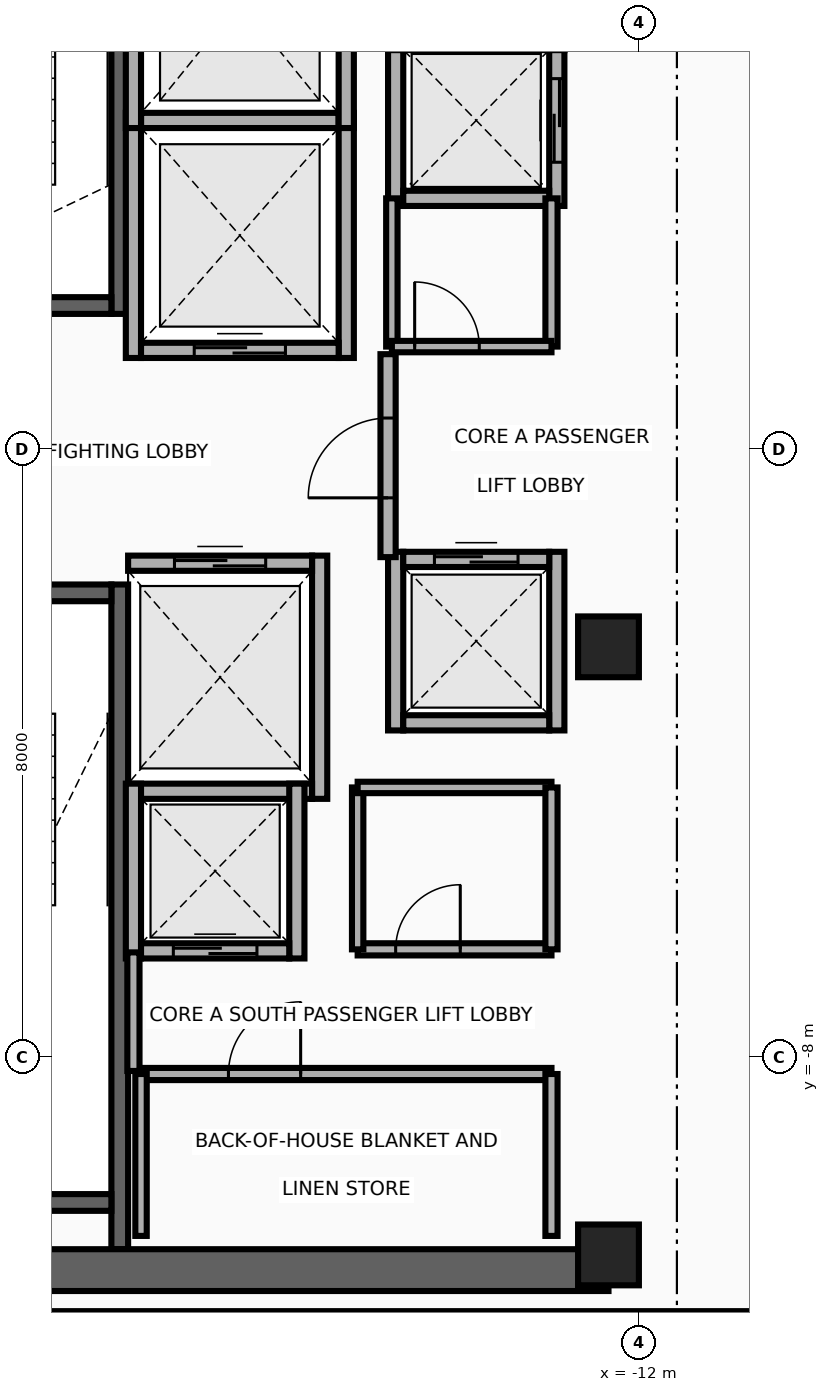
"""IFC4 building model, lengths in metres.
Left out: names, types, materials, properties, quantities, classifications, styles, units other than length and angle.
Written with IfcOpenShell. Run it as: python <this file> out.ifc"""

import sys

from ifc_helpers import new_model, si_unit, direction, frame, frame_2d, origin, origin_2d, place, context, subcontext, project, spatial, rectangle, extrude, source, transform, mapped, element, fill, save


model = new_model("IFC4")
c1 = context("Model", 3, precision=1e-05, world=origin(), true_north=direction((0.0, 1.0)))
c2 = subcontext(c1, "Body", "Model", "MODEL_VIEW")
j1 = project(units=[si_unit("LENGTHUNIT", "METRE"), si_unit("PLANEANGLEUNIT", "RADIAN")], contexts=[c1])
p1 = place(None, origin())
s1 = spatial("IfcSite", under=j1, at=p1, CompositionType="ELEMENT")
p2 = place(p1, origin())
s2 = spatial("IfcBuilding", under=s1, at=p2, CompositionType="ELEMENT")
p3 = place(p2, frame((0.0, 0.0, 247.5)))
s3 = spatial("IfcBuildingStorey", under=s2, at=p3, CompositionType="ELEMENT", Elevation=247.5)
p4 = place(p3, frame((-18.83, 1.78, 0.0), z_axis=(0.0, 0.0, 1.0), x_axis=(0.0, 1.0, 0.0)))
e1 = element("IfcWall", 1, at=p4, inside=s3, PredefinedType="SHEAR", context=c2, shape_type="SweptSolid", body=[
    extrude(rectangle(XDim=8.745, YDim=0.22, at=frame_2d((4.373, 0.0))), origin(), (0.0, 0.0, 1.0), 3.26),
])
p5 = place(p3, frame((-22.05, 1.89, 0.0), z_axis=(0.0, 0.0, 1.0), x_axis=(1.0, 0.0, 0.0)))
e2 = element("IfcWall", 2, at=p5, inside=s3, PredefinedType="SHEAR", context=c2, shape_type="SweptSolid", body=[
    extrude(rectangle(XDim=3.11, YDim=0.22, at=frame_2d((1.555, 0.0))), origin(), (0.0, 0.0, 1.0), 3.26),
])
p6 = place(p5, frame((1.0, 0.0, 0.0)))
e3 = element("IfcOpeningElement", 3, at=p6, cuts=e2, PredefinedType="OPENING", context=c2, shape_type="SweptSolid", body=[
    extrude(rectangle(XDim=1.1, YDim=2.15, at=frame_2d((0.55, 1.075))), frame((0.0, 0.125, 0.0), z_axis=(0.0, -1.0, 0.0), x_axis=(1.0, 0.0, 0.0)), (0.0, 0.0, 1.0), 0.25),
])
p7 = place(p3, frame((-18.83, -10.525, 0.0), z_axis=(0.0, 0.0, 1.0), x_axis=(0.0, 1.0, 0.0)))
e4 = element("IfcWall", 4, at=p7, inside=s3, PredefinedType="SHEAR", context=c2, shape_type="SweptSolid", body=[
    extrude(rectangle(XDim=8.745, YDim=0.22, at=frame_2d((4.373, 0.0))), origin(), (0.0, 0.0, 1.0), 3.26),
])
p8 = place(p3, frame((-22.05, -9.91, 0.0), z_axis=(0.0, 0.0, 1.0), x_axis=(1.0, 0.0, 0.0)))
e5 = element("IfcWall", 5, at=p8, inside=s3, PredefinedType="SHEAR", context=c2, shape_type="SweptSolid", body=[
    extrude(rectangle(XDim=3.11, YDim=0.22, at=frame_2d((1.555, 0.0))), origin(), (0.0, 0.0, 1.0), 3.26),
])
p9 = place(p3, frame((-22.05, -1.89, 0.0), z_axis=(0.0, 0.0, 1.0), x_axis=(1.0, 0.0, 0.0)))
e6 = element("IfcWall", 6, at=p9, inside=s3, PredefinedType="SHEAR", context=c2, shape_type="SweptSolid", body=[
    extrude(rectangle(XDim=3.11, YDim=0.22, at=frame_2d((1.555, 0.0))), origin(), (0.0, 0.0, 1.0), 3.26),
])
p10 = place(p9, frame((1.0, 0.0, 0.0)))
e7 = element("IfcOpeningElement", 7, at=p10, cuts=e6, PredefinedType="OPENING", context=c2, shape_type="SweptSolid", body=[
    extrude(rectangle(XDim=1.1, YDim=2.15, at=frame_2d((0.55, 1.075))), frame((0.0, 0.125, 0.0), z_axis=(0.0, -1.0, 0.0), x_axis=(1.0, 0.0, 0.0)), (0.0, 0.0, 1.0), 0.25),
])
p11 = place(p3, frame((-22.65, -10.8, 0.0), z_axis=(0.0, 0.0, 1.0), x_axis=(1.0, 0.0, 0.0)))
e8 = element("IfcWall", 8, at=p11, inside=s3, PredefinedType="SHEAR", context=c2, shape_type="SweptSolid", body=[
    extrude(rectangle(XDim=10.25, YDim=0.55, at=frame_2d((5.125, 0.0))), origin(), (0.0, 0.0, 1.0), 3.26),
])
m1 = source(origin(), c2, "Body", "SweptSolid", [
    extrude(rectangle(XDim=0.8, YDim=0.8, at=origin_2d()), origin(), (0.0, 0.0, 1.0), 3.5),
])
for number, where, z_axis, x_axis in (
    (9, (-12.4, -10.6, 0.0), (0.0, 0.0, 1.0), (1.0, 0.0, 0.0)),
    (10, (-12.4, -2.6, 0.0), (0.0, 0.0, 1.0), (1.0, 0.0, 0.0)),
):
    element("IfcColumn", number, at=place(p3, frame(where, z_axis=z_axis, x_axis=x_axis)), inside=s3, PredefinedType="COLUMN", context=c2, shape_type="MappedRepresentation", body=[
        mapped(m1, transform((0.0, 0.0, 0.0), x_axis=(1.0, 0.0, 0.0), y_axis=(0.0, 1.0, 0.0), z_axis=(0.0, 0.0, 1.0), scale=1.0)),
    ])
for number, where, z_axis, x_axis in (
    (11, (-18.65, 1.2, 0.0), (0.0, 0.0, 1.0), (0.0, 1.0, 0.0)),
    (12, (-15.85, 1.2, 0.0), (0.0, 0.0, 1.0), (0.0, 1.0, 0.0)),
):
    element("IfcWall", number, at=place(p3, frame(where, z_axis=z_axis, x_axis=x_axis)), inside=s3, PredefinedType="MOVABLE", context=c2, shape_type="SweptSolid", body=[
        extrude(rectangle(XDim=3.225, YDim=0.2, at=frame_2d((1.613, 0.0))), origin(), (0.0, 0.0, 1.0), 3.26),
    ])
p12 = place(p3, frame((-18.55, 1.3, 0.0), z_axis=(0.0, 0.0, 1.0), x_axis=(1.0, 0.0, 0.0)))
e13 = element("IfcWall", 13, at=p12, inside=s3, PredefinedType="MOVABLE", context=c2, shape_type="SweptSolid", body=[
    extrude(rectangle(XDim=2.6, YDim=0.2, at=frame_2d((1.3, 0.0))), origin(), (0.0, 0.0, 1.0), 3.26),
])
p13 = place(p12, frame((0.7, 0.0, 0.0)))
e14 = element("IfcOpeningElement", 14, at=p13, cuts=e13, PredefinedType="OPENING", context=c2, shape_type="SweptSolid", body=[
    extrude(rectangle(XDim=1.2, YDim=2.1, at=frame_2d((0.6, 1.05))), frame((0.0, 0.115, 0.0), z_axis=(0.0, -1.0, 0.0), x_axis=(1.0, 0.0, 0.0)), (0.0, 0.0, 1.0), 0.23),
])
p14 = place(p3, frame((-18.55, 4.325, 0.0), z_axis=(0.0, 0.0, 1.0), x_axis=(1.0, 0.0, 0.0)))
e15 = element("IfcWall", 15, at=p14, inside=s3, PredefinedType="MOVABLE", context=c2, shape_type="SweptSolid", body=[
    extrude(rectangle(XDim=2.6, YDim=0.2, at=frame_2d((1.3, 0.0))), origin(), (0.0, 0.0, 1.0), 3.26),
])
p15 = place(p3, frame((-16.2, -4.6, 0.0), z_axis=(0.0, 0.0, 1.0), x_axis=(0.0, 1.0, 0.0)))
e16 = element("IfcWall", 16, at=p15, inside=s3, PredefinedType="MOVABLE", context=c2, shape_type="SweptSolid", body=[
    extrude(rectangle(XDim=3.2, YDim=0.2, at=frame_2d((1.6, 0.0))), origin(), (0.0, 0.0, 1.0), 3.26),
])
p16 = place(p3, frame((-18.72, -4.5, 0.0), z_axis=(0.0, 0.0, 1.0), x_axis=(1.0, 0.0, 0.0)))
e17 = element("IfcWall", 17, at=p16, inside=s3, PredefinedType="MOVABLE", context=c2, shape_type="SweptSolid", body=[
    extrude(rectangle(XDim=2.42, YDim=0.2, at=frame_2d((1.21, 0.0))), origin(), (0.0, 0.0, 1.0), 3.26),
])
p17 = place(p3, frame((-18.72, -1.5, 0.0), z_axis=(0.0, 0.0, 1.0), x_axis=(1.0, 0.0, 0.0)))
e18 = element("IfcWall", 18, at=p17, inside=s3, PredefinedType="MOVABLE", context=c2, shape_type="SweptSolid", body=[
    extrude(rectangle(XDim=2.42, YDim=0.2, at=frame_2d((1.21, 0.0))), origin(), (0.0, 0.0, 1.0), 3.26),
])
p18 = place(p17, frame((0.61, 0.0, 0.0)))
e19 = element("IfcOpeningElement", 19, at=p18, cuts=e18, PredefinedType="OPENING", context=c2, shape_type="SweptSolid", body=[
    extrude(rectangle(XDim=1.2, YDim=2.1, at=frame_2d((0.6, 1.05))), frame((0.0, 0.115, 0.0), z_axis=(0.0, -1.0, 0.0), x_axis=(1.0, 0.0, 0.0)), (0.0, 0.0, 1.0), 0.23),
])
for number, where, z_axis, x_axis in (
    (20, (-18.65, 4.225, 0.0), (0.0, 0.0, 1.0), (0.0, 1.0, 0.0)),
    (21, (-15.85, 4.225, 0.0), (0.0, 0.0, 1.0), (0.0, 1.0, 0.0)),
):
    element("IfcWall", number, at=place(p3, frame(where, z_axis=z_axis, x_axis=x_axis)), inside=s3, PredefinedType="MOVABLE", context=c2, shape_type="SweptSolid", body=[
        extrude(rectangle(XDim=3.325, YDim=0.2, at=frame_2d((1.663, 0.0))), origin(), (0.0, 0.0, 1.0), 3.26),
    ])
p19 = place(p3, frame((-15.2, 3.2, 0.0), z_axis=(0.0, 0.0, 1.0), x_axis=(0.0, 1.0, 0.0)))
e22 = element("IfcWall", 22, at=p19, inside=s3, PredefinedType="MOVABLE", context=c2, shape_type="SweptSolid", body=[
    extrude(rectangle(XDim=2.25, YDim=0.2, at=frame_2d((1.125, 0.0))), origin(), (0.0, 0.0, 1.0), 3.26),
])
p20 = place(p3, frame((-13.08, 3.2, 0.0), z_axis=(0.0, 0.0, 1.0), x_axis=(0.0, 1.0, 0.0)))
e23 = element("IfcWall", 23, at=p20, inside=s3, PredefinedType="MOVABLE", context=c2, shape_type="SweptSolid", body=[
    extrude(rectangle(XDim=2.25, YDim=0.2, at=frame_2d((1.125, 0.0))), origin(), (0.0, 0.0, 1.0), 3.26),
])
p21 = place(p20, frame((0.575, 0.0, 0.0)))
e24 = element("IfcOpeningElement", 24, at=p21, cuts=e23, PredefinedType="OPENING", context=c2, shape_type="SweptSolid", body=[
    extrude(rectangle(XDim=1.1, YDim=2.1, at=frame_2d((0.55, 1.05))), frame((0.0, 0.115, 0.0), z_axis=(0.0, -1.0, 0.0), x_axis=(1.0, 0.0, 0.0)), (0.0, 0.0, 1.0), 0.23),
])
p22 = place(p3, frame((-15.1, 3.3, 0.0), z_axis=(0.0, 0.0, 1.0), x_axis=(1.0, 0.0, 0.0)))
e25 = element("IfcWall", 25, at=p22, inside=s3, PredefinedType="MOVABLE", context=c2, shape_type="SweptSolid", body=[
    extrude(rectangle(XDim=1.92, YDim=0.2, at=frame_2d((0.96, 0.0))), origin(), (0.0, 0.0, 1.0), 3.26),
])
for number, where, z_axis, x_axis in (
    (26, (-18.65, -6.7, 0.0), (0.0, 0.0, 1.0), (0.0, 1.0, 0.0)),
    (27, (-16.5, -6.7, 0.0), (0.0, 0.0, 1.0), (0.0, 1.0, 0.0)),
):
    element("IfcWall", number, at=place(p3, frame(where, z_axis=z_axis, x_axis=x_axis)), inside=s3, PredefinedType="MOVABLE", context=c2, shape_type="SweptSolid", body=[
        extrude(rectangle(XDim=2.3, YDim=0.2, at=frame_2d((1.15, 0.0))), origin(), (0.0, 0.0, 1.0), 3.26),
    ])
p23 = place(p3, frame((-18.55, -6.6, 0.0), z_axis=(0.0, 0.0, 1.0), x_axis=(1.0, 0.0, 0.0)))
e28 = element("IfcWall", 28, at=p23, inside=s3, PredefinedType="MOVABLE", context=c2, shape_type="SweptSolid", body=[
    extrude(rectangle(XDim=1.95, YDim=0.2, at=frame_2d((0.975, 0.0))), origin(), (0.0, 0.0, 1.0), 3.26),
])
p24 = place(p23, frame((0.425, 0.0, 0.0)))
e29 = element("IfcOpeningElement", 29, at=p24, cuts=e28, PredefinedType="OPENING", context=c2, shape_type="SweptSolid", body=[
    extrude(rectangle(XDim=1.1, YDim=2.1, at=frame_2d((0.55, 1.05))), frame((0.0, 0.115, 0.0), z_axis=(0.0, -1.0, 0.0), x_axis=(1.0, 0.0, 0.0)), (0.0, 0.0, 1.0), 0.23),
])
for number, where, z_axis, x_axis in (
    (30, (-15.2, -3.7, 0.0), (0.0, 0.0, 1.0), (0.0, 1.0, 0.0)),
    (31, (-13.08, -3.7, 0.0), (0.0, 0.0, 1.0), (0.0, 1.0, 0.0)),
):
    element("IfcWall", number, at=place(p3, frame(where, z_axis=z_axis, x_axis=x_axis)), inside=s3, PredefinedType="MOVABLE", context=c2, shape_type="SweptSolid", body=[
        extrude(rectangle(XDim=2.35, YDim=0.2, at=frame_2d((1.175, 0.0))), origin(), (0.0, 0.0, 1.0), 3.26),
    ])
p25 = place(p3, frame((-15.1, -3.6, 0.0), z_axis=(0.0, 0.0, 1.0), x_axis=(1.0, 0.0, 0.0)))
e32 = element("IfcWall", 32, at=p25, inside=s3, PredefinedType="MOVABLE", context=c2, shape_type="SweptSolid", body=[
    extrude(rectangle(XDim=1.92, YDim=0.2, at=frame_2d((0.96, 0.0))), origin(), (0.0, 0.0, 1.0), 3.26),
])
p26 = place(p3, frame((-15.1, -1.45, 0.0), z_axis=(0.0, 0.0, 1.0), x_axis=(1.0, 0.0, 0.0)))
e33 = element("IfcWall", 33, at=p26, inside=s3, PredefinedType="MOVABLE", context=c2, shape_type="SweptSolid", body=[
    extrude(rectangle(XDim=1.92, YDim=0.2, at=frame_2d((0.96, 0.0))), origin(), (0.0, 0.0, 1.0), 3.26),
])
p27 = place(p26, frame((0.41, 0.0, 0.0)))
e34 = element("IfcOpeningElement", 34, at=p27, cuts=e33, PredefinedType="OPENING", context=c2, shape_type="SweptSolid", body=[
    extrude(rectangle(XDim=1.1, YDim=2.1, at=frame_2d((0.55, 1.05))), frame((0.0, 0.115, 0.0), z_axis=(0.0, -1.0, 0.0), x_axis=(1.0, 0.0, 0.0)), (0.0, 0.0, 1.0), 0.23),
])
p28 = place(p3, frame((-15.3, -1.42, 0.0), z_axis=(0.0, 0.0, 1.0), x_axis=(0.0, 1.0, 0.0)))
e35 = element("IfcWall", 35, at=p28, inside=s3, PredefinedType="PARTITIONING", context=c2, shape_type="SweptSolid", body=[
    extrude(rectangle(XDim=2.67, YDim=0.2, at=frame_2d((1.335, 0.0))), origin(), (0.0, 0.0, 1.0), 3.26),
])
p29 = place(p28, frame((0.78, 0.0, 0.0)))
e36 = element("IfcOpeningElement", 36, at=p29, cuts=e35, PredefinedType="OPENING", context=c2, shape_type="SweptSolid", body=[
    extrude(rectangle(XDim=1.05, YDim=2.15, at=frame_2d((0.525, 1.075))), frame((0.0, 0.115, 0.0), z_axis=(0.0, -1.0, 0.0), x_axis=(1.0, 0.0, 0.0)), (0.0, 0.0, 1.0), 0.23),
])
p30 = place(p3, frame((-18.65, -8.18, 0.0), z_axis=(0.0, 0.0, 1.0), x_axis=(0.0, 1.0, 0.0)))
e37 = element("IfcWall", 37, at=p30, inside=s3, PredefinedType="PARTITIONING", context=c2, shape_type="SweptSolid", body=[
    extrude(rectangle(XDim=1.56, YDim=0.16, at=frame_2d((0.78, 0.0))), origin(), (0.0, 0.0, 1.0), 3.26),
])
p31 = place(p3, frame((-18.55, -8.22, 0.0), z_axis=(0.0, 0.0, 1.0), x_axis=(1.0, 0.0, 0.0)))
e38 = element("IfcWall", 38, at=p31, inside=s3, PredefinedType="PARTITIONING", context=c2, shape_type="SweptSolid", body=[
    extrude(rectangle(XDim=5.4, YDim=0.16, at=frame_2d((2.7, 0.0))), origin(), (0.0, 0.0, 1.0), 3.26),
])
p32 = place(p31, frame((1.15, 0.0, 0.0)))
e39 = element("IfcOpeningElement", 39, at=p32, cuts=e38, PredefinedType="OPENING", context=c2, shape_type="SweptSolid", body=[
    extrude(rectangle(XDim=0.95, YDim=2.15, at=frame_2d((0.475, 1.075))), frame((0.0, 0.095, 0.0), z_axis=(0.0, -1.0, 0.0), x_axis=(1.0, 0.0, 0.0)), (0.0, 0.0, 1.0), 0.19),
])
p33 = place(p3, frame((-18.55, -10.35, 0.0), z_axis=(0.0, 0.0, 1.0), x_axis=(0.0, 1.0, 0.0)))
e40 = element("IfcWall", 40, at=p33, inside=s3, PredefinedType="PARTITIONING", context=c2, shape_type="SweptSolid", body=[
    extrude(rectangle(XDim=2.13, YDim=0.15, at=frame_2d((1.065, 0.0))), origin(), (0.0, 0.0, 1.0), 3.26),
])
p34 = place(p3, frame((-13.15, -10.35, 0.0), z_axis=(0.0, 0.0, 1.0), x_axis=(0.0, 1.0, 0.0)))
e41 = element("IfcWall", 41, at=p34, inside=s3, PredefinedType="PARTITIONING", context=c2, shape_type="SweptSolid", body=[
    extrude(rectangle(XDim=2.13, YDim=0.16, at=frame_2d((1.065, 0.0))), origin(), (0.0, 0.0, 1.0), 3.26),
])
p35 = place(p3, frame((-15.7, -6.58, 0.0), z_axis=(0.0, 0.0, 1.0), x_axis=(1.0, 0.0, 0.0)))
e42 = element("IfcWall", 42, at=p35, inside=s3, PredefinedType="PARTITIONING", context=c2, shape_type="SweptSolid", body=[
    extrude(rectangle(XDim=2.55, YDim=0.16, at=frame_2d((1.275, 0.0))), origin(), (0.0, 0.0, 1.0), 3.26),
])
p36 = place(p35, frame((0.5, 0.0, 0.0)))
e43 = element("IfcOpeningElement", 43, at=p36, cuts=e42, PredefinedType="OPENING", context=c2, shape_type="SweptSolid", body=[
    extrude(rectangle(XDim=0.85, YDim=2.05, at=frame_2d((0.425, 1.025))), frame((0.0, 0.095, 0.0), z_axis=(0.0, -1.0, 0.0), x_axis=(1.0, 0.0, 0.0)), (0.0, 0.0, 1.0), 0.19),
])
p37 = place(p3, frame((-15.7, -6.58, 0.0), z_axis=(0.0, 0.0, 1.0), x_axis=(0.0, 1.0, 0.0)))
e44 = element("IfcWall", 44, at=p37, inside=s3, PredefinedType="PARTITIONING", context=c2, shape_type="SweptSolid", body=[
    extrude(rectangle(XDim=2.13, YDim=0.15, at=frame_2d((1.065, 0.0))), origin(), (0.0, 0.0, 1.0), 3.26),
])
p38 = place(p3, frame((-15.7, -4.45, 0.0), z_axis=(0.0, 0.0, 1.0), x_axis=(1.0, 0.0, 0.0)))
e45 = element("IfcWall", 45, at=p38, inside=s3, PredefinedType="PARTITIONING", context=c2, shape_type="SweptSolid", body=[
    extrude(rectangle(XDim=2.55, YDim=0.15, at=frame_2d((1.275, 0.0))), origin(), (0.0, 0.0, 1.0), 3.26),
])
p39 = place(p3, frame((-13.15, -6.58, 0.0), z_axis=(0.0, 0.0, 1.0), x_axis=(0.0, 1.0, 0.0)))
e46 = element("IfcWall", 46, at=p39, inside=s3, PredefinedType="PARTITIONING", context=c2, shape_type="SweptSolid", body=[
    extrude(rectangle(XDim=2.13, YDim=0.16, at=frame_2d((1.065, 0.0))), origin(), (0.0, 0.0, 1.0), 3.26),
])
p40 = place(p3, frame((-13.15, 1.35, 0.0), z_axis=(0.0, 0.0, 1.0), x_axis=(0.0, 1.0, 0.0)))
e47 = element("IfcWall", 47, at=p40, inside=s3, PredefinedType="PARTITIONING", context=c2, shape_type="SweptSolid", body=[
    extrude(rectangle(XDim=1.95, YDim=0.16, at=frame_2d((0.975, 0.0))), origin(), (0.0, 0.0, 1.0), 3.26),
])
p41 = place(p3, frame((-15.25, 1.35, 0.0), z_axis=(0.0, 0.0, 1.0), x_axis=(0.0, 1.0, 0.0)))
e48 = element("IfcWall", 48, at=p41, inside=s3, PredefinedType="PARTITIONING", context=c2, shape_type="SweptSolid", body=[
    extrude(rectangle(XDim=1.95, YDim=0.15, at=frame_2d((0.975, 0.0))), origin(), (0.0, 0.0, 1.0), 3.26),
])
p42 = place(p3, frame((-15.25, 1.35, 0.0), z_axis=(0.0, 0.0, 1.0), x_axis=(1.0, 0.0, 0.0)))
e49 = element("IfcWall", 49, at=p42, inside=s3, PredefinedType="PARTITIONING", context=c2, shape_type="SweptSolid", body=[
    extrude(rectangle(XDim=2.1, YDim=0.15, at=frame_2d((1.05, 0.0))), origin(), (0.0, 0.0, 1.0), 3.26),
])
p43 = place(p42, frame((0.3, 0.0, 0.0)))
e50 = element("IfcOpeningElement", 50, at=p43, cuts=e49, PredefinedType="OPENING", context=c2, shape_type="SweptSolid", body=[
    extrude(rectangle(XDim=0.85, YDim=2.05, at=frame_2d((0.425, 1.025))), frame((0.0, 0.09, 0.0), z_axis=(0.0, -1.0, 0.0), x_axis=(1.0, 0.0, 0.0)), (0.0, 0.0, 1.0), 0.18),
])
p44 = place(p3, frame((-23.45, -11.42, 0.0), z_axis=(0.0, 0.0, 1.0), x_axis=(1.0, 0.0, 0.0)))
e51 = element("IfcWall", 51, at=p44, inside=s3, PredefinedType="PARTITIONING", context=c2, shape_type="SweptSolid", body=[
    extrude(rectangle(XDim=13.84, YDim=0.16, at=frame_2d((6.92, 0.0))), origin(), (0.0, 0.0, 1.0), 2.634),
])
p45 = place(p13, origin())
e52 = element("IfcDoor", 52, at=p45, inside=s3, OperationType="DOUBLE_DOOR_SLIDING", PredefinedType="DOOR", context=c2, shape_type="SweptSolid", body=[
    extrude(rectangle(XDim=1.2, YDim=2.1, at=frame_2d((0.6, 1.05))), frame((0.0, 0.025, 0.0), z_axis=(0.0, -1.0, 0.0), x_axis=(1.0, 0.0, 0.0)), (0.0, 0.0, 1.0), 0.05),
])
fill(e14, e52)
p46 = place(p18, origin())
e53 = element("IfcDoor", 53, at=p46, inside=s3, OperationType="DOUBLE_DOOR_SLIDING", PredefinedType="DOOR", context=c2, shape_type="SweptSolid", body=[
    extrude(rectangle(XDim=1.2, YDim=2.1, at=frame_2d((0.6, 1.05))), frame((0.0, 0.025, 0.0), z_axis=(0.0, -1.0, 0.0), x_axis=(1.0, 0.0, 0.0)), (0.0, 0.0, 1.0), 0.05),
])
fill(e19, e53)
p47 = place(p21, origin())
e54 = element("IfcDoor", 54, at=p47, inside=s3, OperationType="DOUBLE_DOOR_SLIDING", PredefinedType="DOOR", context=c2, shape_type="SweptSolid", body=[
    extrude(rectangle(XDim=1.1, YDim=2.1, at=frame_2d((0.55, 1.05))), frame((0.0, 0.025, 0.0), z_axis=(0.0, -1.0, 0.0), x_axis=(1.0, 0.0, 0.0)), (0.0, 0.0, 1.0), 0.05),
])
fill(e24, e54)
p48 = place(p24, origin())
e55 = element("IfcDoor", 55, at=p48, inside=s3, OperationType="DOUBLE_DOOR_SLIDING", PredefinedType="DOOR", context=c2, shape_type="SweptSolid", body=[
    extrude(rectangle(XDim=1.1, YDim=2.1, at=frame_2d((0.55, 1.05))), frame((0.0, 0.025, 0.0), z_axis=(0.0, -1.0, 0.0), x_axis=(1.0, 0.0, 0.0)), (0.0, 0.0, 1.0), 0.05),
])
fill(e29, e55)
p49 = place(p27, origin())
e56 = element("IfcDoor", 56, at=p49, inside=s3, OperationType="DOUBLE_DOOR_SLIDING", PredefinedType="DOOR", context=c2, shape_type="SweptSolid", body=[
    extrude(rectangle(XDim=1.1, YDim=2.1, at=frame_2d((0.55, 1.05))), frame((0.0, 0.025, 0.0), z_axis=(0.0, -1.0, 0.0), x_axis=(1.0, 0.0, 0.0)), (0.0, 0.0, 1.0), 0.05),
])
fill(e34, e56)
p50 = place(p29, origin())
e57 = element("IfcDoor", 57, at=p50, inside=s3, OperationType="SINGLE_SWING_RIGHT", PredefinedType="DOOR", context=c2, shape_type="SweptSolid", body=[
    extrude(rectangle(XDim=1.05, YDim=2.15, at=frame_2d((0.525, 1.075))), frame((0.0, 0.025, 0.0), z_axis=(0.0, -1.0, 0.0), x_axis=(1.0, 0.0, 0.0)), (0.0, 0.0, 1.0), 0.05),
])
fill(e36, e57)
p51 = place(p32, origin())
e58 = element("IfcDoor", 58, at=p51, inside=s3, OperationType="SINGLE_SWING_LEFT", PredefinedType="DOOR", context=c2, shape_type="SweptSolid", body=[
    extrude(rectangle(XDim=0.95, YDim=2.15, at=frame_2d((0.475, 1.075))), frame((0.0, 0.025, 0.0), z_axis=(0.0, -1.0, 0.0), x_axis=(1.0, 0.0, 0.0)), (0.0, 0.0, 1.0), 0.05),
])
fill(e39, e58)
p52 = place(p36, origin())
e59 = element("IfcDoor", 59, at=p52, inside=s3, OperationType="SINGLE_SWING_RIGHT", PredefinedType="DOOR", context=c2, shape_type="SweptSolid", body=[
    extrude(rectangle(XDim=0.85, YDim=2.05, at=frame_2d((0.425, 1.025))), frame((0.0, 0.025, 0.0), z_axis=(0.0, -1.0, 0.0), x_axis=(1.0, 0.0, 0.0)), (0.0, 0.0, 1.0), 0.05),
])
fill(e43, e59)
p53 = place(p43, origin())
e60 = element("IfcDoor", 60, at=p53, inside=s3, OperationType="SINGLE_SWING_LEFT", PredefinedType="DOOR", context=c2, shape_type="SweptSolid", body=[
    extrude(rectangle(XDim=0.85, YDim=2.05, at=frame_2d((0.425, 1.025))), frame((0.0, 0.025, 0.0), z_axis=(0.0, -1.0, 0.0), x_axis=(1.0, 0.0, 0.0)), (0.0, 0.0, 1.0), 0.05),
])
fill(e50, e60)
save(model, sys.argv[1])
